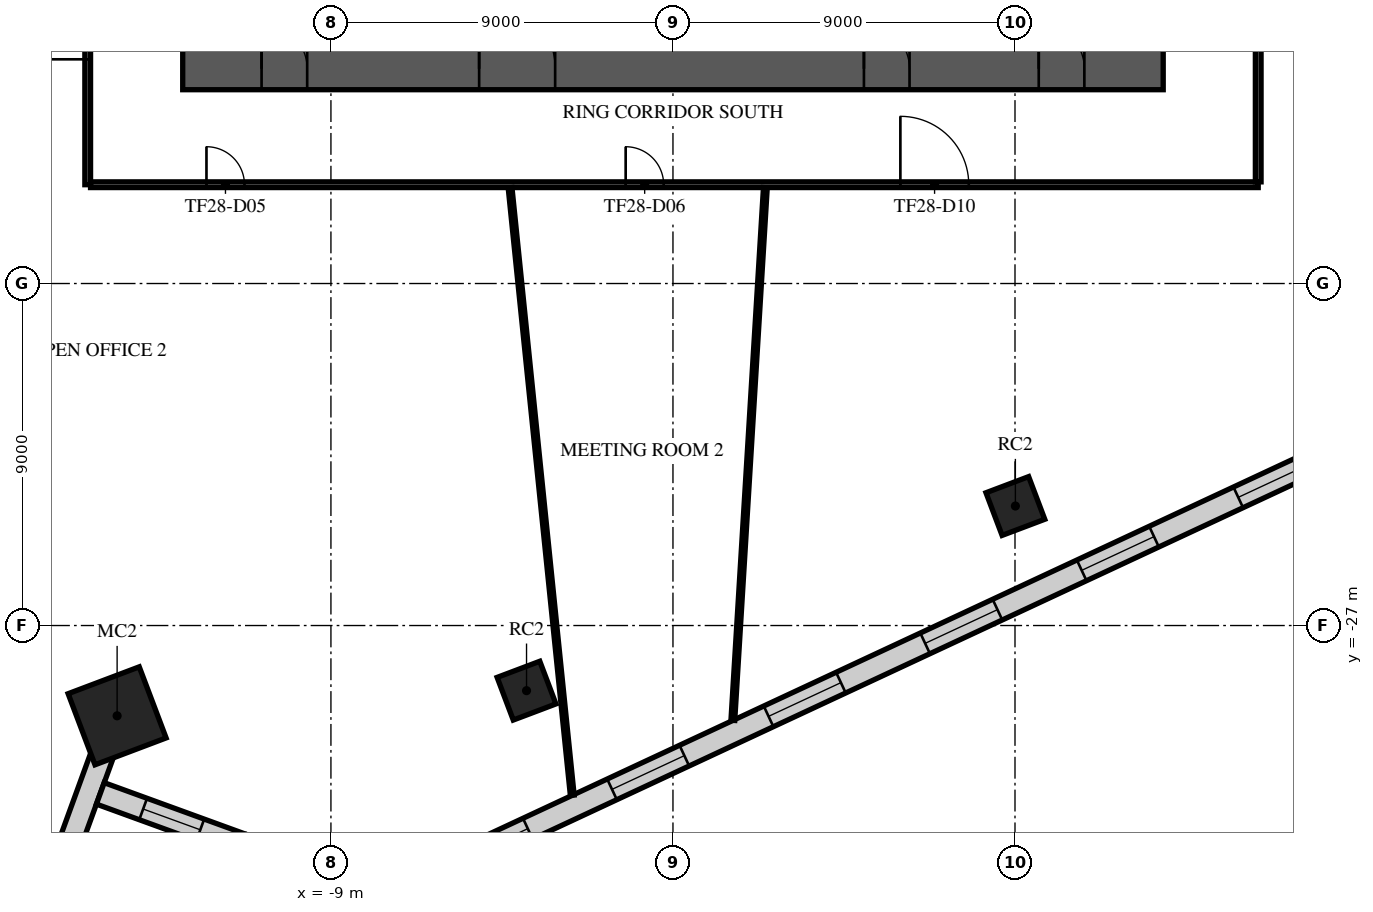
"""IFC4 building model, lengths in metres.
Left out: names, types, materials, properties, quantities, classifications, styles, units other than length and angle.
Written with IfcOpenShell. Run it as: python <this file> out.ifc"""

import sys

from ifc_helpers import new_model, si_unit, direction, frame, frame_2d, origin, origin_2d, place, context, subcontext, project, spatial, rectangle, extrude, element, fill, save


model = new_model("IFC4")
c1 = context("Model", 3, precision=1e-05, world=origin(), true_north=direction((0.0, 1.0)))
c2 = subcontext(c1, "Body", "Model", "MODEL_VIEW")
j1 = project(units=[si_unit("LENGTHUNIT", "METRE"), si_unit("PLANEANGLEUNIT", "RADIAN")], contexts=[c1])
p1 = place(None, origin())
s1 = spatial("IfcSite", under=j1, at=p1, CompositionType="ELEMENT")
p2 = place(p1, origin())
s2 = spatial("IfcBuilding", under=s1, at=p2, CompositionType="ELEMENT")
p3 = place(p2, frame((0.0, 0.0, 122.1)))
s3 = spatial("IfcBuildingStorey", under=s2, at=p3, CompositionType="ELEMENT", Elevation=122.1)
p4 = place(p3, frame((-14.626, -29.376, 0.0), z_axis=(0.0, 0.0, 1.0), x_axis=(0.935491525991, 0.353349125935, 0.0)))
e1 = element("IfcColumn", 1, at=p4, inside=s3, PredefinedType="COLUMN", context=c2, shape_type="SweptSolid", body=[
    extrude(rectangle(XDim=2.0, YDim=2.0, at=origin_2d()), origin(), (0.0, 0.0, 1.0), 4.0),
])
for number, where, z_axis, x_axis in (
    (2, (-3.853, -28.714, 0.0), (0.0, 0.0, 1.0), (0.935, 0.353, 0.0)),
    (3, (9.01, -23.855, 0.0), (0.0, 0.0, 1.0), (0.935, 0.353, 0.0)),
):
    element("IfcColumn", number, at=place(p3, frame(where, z_axis=z_axis, x_axis=x_axis)), inside=s3, PredefinedType="COLUMN", context=c2, shape_type="SweptSolid", body=[
        extrude(rectangle(XDim=1.2, YDim=1.2, at=origin_2d()), origin(), (0.0, 0.0, 1.0), 4.0),
    ])
p5 = place(p3, frame((-12.9, -12.35, 0.0), z_axis=(0.0, 0.0, 1.0), x_axis=(1.0, 0.0, 0.0)))
e4 = element("IfcWall", 4, at=p5, inside=s3, PredefinedType="SHEAR", context=c2, shape_type="SweptSolid", body=[
    extrude(rectangle(XDim=25.8, YDim=1.1, at=frame_2d((12.9, 0.0))), origin(), (0.0, 0.0, 1.0), 3.58),
])
p6 = place(p5, frame((7.8, 0.0, 0.0)))
e5 = element("IfcOpeningElement", 5, at=p6, cuts=e4, PredefinedType="OPENING", context=c2, shape_type="SweptSolid", body=[
    extrude(rectangle(XDim=2.0, YDim=2.1, at=frame_2d((1.0, 1.05))), frame((0.0, 0.56, 0.0), z_axis=(0.0, -1.0, 0.0), x_axis=(1.0, 0.0, 0.0)), (0.0, 0.0, 1.0), 1.12),
])
p7 = place(p5, frame((17.925, 0.0, 0.0)))
e6 = element("IfcOpeningElement", 6, at=p7, cuts=e4, PredefinedType="OPENING", context=c2, shape_type="SweptSolid", body=[
    extrude(rectangle(XDim=1.2, YDim=2.1, at=frame_2d((0.6, 1.05))), frame((0.0, 0.56, 0.0), z_axis=(0.0, -1.0, 0.0), x_axis=(1.0, 0.0, 0.0)), (0.0, 0.0, 1.0), 1.12),
])
p8 = place(p5, frame((2.075, 0.0, 0.0)))
e7 = element("IfcOpeningElement", 7, at=p8, cuts=e4, PredefinedType="OPENING", context=c2, shape_type="SweptSolid", body=[
    extrude(rectangle(XDim=1.2, YDim=2.1, at=frame_2d((0.6, 1.05))), frame((0.0, 0.56, 0.0), z_axis=(0.0, -1.0, 0.0), x_axis=(1.0, 0.0, 0.0)), (0.0, 0.0, 1.0), 1.12),
])
p9 = place(p5, frame((22.525, 0.0, 0.0)))
e8 = element("IfcOpeningElement", 8, at=p9, cuts=e4, PredefinedType="OPENING", context=c2, shape_type="SweptSolid", body=[
    extrude(rectangle(XDim=1.2, YDim=2.1, at=frame_2d((0.6, 1.05))), frame((0.0, 0.56, 0.0), z_axis=(0.0, -1.0, 0.0), x_axis=(1.0, 0.0, 0.0)), (0.0, 0.0, 1.0), 1.12),
])
p10 = place(p3, frame((-16.103, -33.382, 0.0), z_axis=(0.0, 0.0, 1.0), x_axis=(0.342003629731, 0.939698631079, 0.0)))
e9 = element("IfcWall", 9, at=p10, inside=s3, PredefinedType="STANDARD", context=c2, shape_type="SweptSolid", body=[
    extrude(rectangle(XDim=3.159, YDim=0.6, at=frame_2d((1.58, 0.0))), origin(), (0.0, 0.0, 1.0), 3.58),
])
p11 = place(p3, frame((-15.068, -31.418, 0.0), z_axis=(0.0, 0.0, 1.0), x_axis=(0.939679314823, -0.342056698946, 0.0)))
e10 = element("IfcWall", 10, at=p11, inside=s3, PredefinedType="STANDARD", context=c2, shape_type="SweptSolid", body=[
    extrude(rectangle(XDim=4.0, YDim=0.6, at=frame_2d((2.0, 0.0))), origin(), (0.0, 0.0, 1.0), 3.58),
])
p12 = place(p11, frame((1.2, 0.0, 0.9)))
e11 = element("IfcOpeningElement", 11, at=p12, cuts=e10, PredefinedType="OPENING", context=c2, shape_type="SweptSolid", body=[
    extrude(rectangle(XDim=1.6, YDim=2.1, at=frame_2d((0.8, 1.05))), frame((0.0, 0.31, 0.0), z_axis=(0.0, -1.0, 0.0), x_axis=(1.0, 0.0, 0.0)), (0.0, 0.0, 1.0), 0.62),
])
p13 = place(p3, frame((-10.838, -35.618, 0.0), z_axis=(0.0, 0.0, 1.0), x_axis=(0.906307589826, 0.422618684659, 0.0)))
e12 = element("IfcWall", 12, at=p13, inside=s3, PredefinedType="STANDARD", context=c2, shape_type="SweptSolid", body=[
    extrude(rectangle(XDim=49.751, YDim=0.6, at=frame_2d((24.876, 0.0))), origin(), (0.0, 0.0, 1.0), 3.58),
])
p14 = place(p13, frame((1.161, 0.0, 0.9)))
e13 = element("IfcOpeningElement", 13, at=p14, cuts=e12, PredefinedType="OPENING", context=c2, shape_type="SweptSolid", body=[
    extrude(rectangle(XDim=2.1, YDim=2.1, at=frame_2d((1.05, 1.05))), frame((0.0, 0.31, 0.0), z_axis=(0.0, -1.0, 0.0), x_axis=(1.0, 0.0, 0.0)), (0.0, 0.0, 1.0), 0.62),
])
p15 = place(p13, frame((5.644, 0.0, 0.9)))
e14 = element("IfcOpeningElement", 14, at=p15, cuts=e12, PredefinedType="OPENING", context=c2, shape_type="SweptSolid", body=[
    extrude(rectangle(XDim=2.1, YDim=2.1, at=frame_2d((1.05, 1.05))), frame((0.0, 0.31, 0.0), z_axis=(0.0, -1.0, 0.0), x_axis=(1.0, 0.0, 0.0)), (0.0, 0.0, 1.0), 0.62),
])
p16 = place(p13, frame((10.189, 0.0, 0.9)))
e15 = element("IfcOpeningElement", 15, at=p16, cuts=e12, PredefinedType="OPENING", context=c2, shape_type="SweptSolid", body=[
    extrude(rectangle(XDim=2.1, YDim=2.1, at=frame_2d((1.05, 1.05))), frame((0.0, 0.31, 0.0), z_axis=(0.0, -1.0, 0.0), x_axis=(1.0, 0.0, 0.0)), (0.0, 0.0, 1.0), 0.62),
])
p17 = place(p13, frame((14.735, 0.0, 0.9)))
e16 = element("IfcOpeningElement", 16, at=p17, cuts=e12, PredefinedType="OPENING", context=c2, shape_type="SweptSolid", body=[
    extrude(rectangle(XDim=2.1, YDim=2.1, at=frame_2d((1.05, 1.05))), frame((0.0, 0.31, 0.0), z_axis=(0.0, -1.0, 0.0), x_axis=(1.0, 0.0, 0.0)), (0.0, 0.0, 1.0), 0.62),
])
p18 = place(p13, frame((19.28, 0.0, 0.9)))
e17 = element("IfcOpeningElement", 17, at=p18, cuts=e12, PredefinedType="OPENING", context=c2, shape_type="SweptSolid", body=[
    extrude(rectangle(XDim=2.1, YDim=2.1, at=frame_2d((1.05, 1.05))), frame((0.0, 0.31, 0.0), z_axis=(0.0, -1.0, 0.0), x_axis=(1.0, 0.0, 0.0)), (0.0, 0.0, 1.0), 0.62),
])
p19 = place(p13, frame((23.826, 0.0, 0.9)))
e18 = element("IfcOpeningElement", 18, at=p19, cuts=e12, PredefinedType="OPENING", context=c2, shape_type="SweptSolid", body=[
    extrude(rectangle(XDim=2.1, YDim=2.1, at=frame_2d((1.05, 1.05))), frame((0.0, 0.31, 0.0), z_axis=(0.0, -1.0, 0.0), x_axis=(1.0, 0.0, 0.0)), (0.0, 0.0, 1.0), 0.62),
])
p20 = place(p13, frame((28.371, 0.0, 0.9)))
e19 = element("IfcOpeningElement", 19, at=p20, cuts=e12, PredefinedType="OPENING", context=c2, shape_type="SweptSolid", body=[
    extrude(rectangle(XDim=2.1, YDim=2.1, at=frame_2d((1.05, 1.05))), frame((0.0, 0.31, 0.0), z_axis=(0.0, -1.0, 0.0), x_axis=(1.0, 0.0, 0.0)), (0.0, 0.0, 1.0), 0.62),
])
p21 = place(p13, frame((32.917, 0.0, 0.9)))
e20 = element("IfcOpeningElement", 20, at=p21, cuts=e12, PredefinedType="OPENING", context=c2, shape_type="SweptSolid", body=[
    extrude(rectangle(XDim=2.1, YDim=2.1, at=frame_2d((1.05, 1.05))), frame((0.0, 0.31, 0.0), z_axis=(0.0, -1.0, 0.0), x_axis=(1.0, 0.0, 0.0)), (0.0, 0.0, 1.0), 0.62),
])
p22 = place(p13, frame((37.462, 0.0, 0.9)))
e21 = element("IfcOpeningElement", 21, at=p22, cuts=e12, PredefinedType="OPENING", context=c2, shape_type="SweptSolid", body=[
    extrude(rectangle(XDim=2.1, YDim=2.1, at=frame_2d((1.05, 1.05))), frame((0.0, 0.31, 0.0), z_axis=(0.0, -1.0, 0.0), x_axis=(1.0, 0.0, 0.0)), (0.0, 0.0, 1.0), 0.62),
])
p23 = place(p13, frame((42.008, 0.0, 0.9)))
e22 = element("IfcOpeningElement", 22, at=p23, cuts=e12, PredefinedType="OPENING", context=c2, shape_type="SweptSolid", body=[
    extrude(rectangle(XDim=2.1, YDim=2.1, at=frame_2d((1.05, 1.05))), frame((0.0, 0.31, 0.0), z_axis=(0.0, -1.0, 0.0), x_axis=(1.0, 0.0, 0.0)), (0.0, 0.0, 1.0), 0.62),
])
p24 = place(p13, frame((46.491, 0.0, 0.9)))
e23 = element("IfcOpeningElement", 23, at=p24, cuts=e12, PredefinedType="OPENING", context=c2, shape_type="SweptSolid", body=[
    extrude(rectangle(XDim=2.1, YDim=2.1, at=frame_2d((1.05, 1.05))), frame((0.0, 0.31, 0.0), z_axis=(0.0, -1.0, 0.0), x_axis=(1.0, 0.0, 0.0)), (0.0, 0.0, 1.0), 0.62),
])
p25 = place(p3, frame((-15.4, -15.4, 0.0), z_axis=(0.0, 0.0, 1.0), x_axis=(0.0, 1.0, 0.0)))
e24 = element("IfcWall", 24, at=p25, inside=s3, PredefinedType="PARTITIONING", context=c2, shape_type="SweptSolid", body=[
    extrude(rectangle(XDim=30.8, YDim=0.15, at=frame_2d((15.4, 0.0))), origin(), (0.0, 0.0, 1.0), 3.08),
])
p26 = place(p25, frame((13.024, 0.0, 0.0)))
e25 = element("IfcOpeningElement", 25, at=p26, cuts=e24, PredefinedType="OPENING", context=c2, shape_type="SweptSolid", body=[
    extrude(rectangle(XDim=1.0, YDim=2.1, at=frame_2d((0.5, 1.05))), frame((0.0, 0.085, 0.0), z_axis=(0.0, -1.0, 0.0), x_axis=(1.0, 0.0, 0.0)), (0.0, 0.0, 1.0), 0.17),
])
p27 = place(p25, frame((18.069, 0.0, 0.0)))
e26 = element("IfcOpeningElement", 26, at=p27, cuts=e24, PredefinedType="OPENING", context=c2, shape_type="SweptSolid", body=[
    extrude(rectangle(XDim=1.8, YDim=2.1, at=frame_2d((0.9, 1.05))), frame((0.0, 0.085, 0.0), z_axis=(0.0, -1.0, 0.0), x_axis=(1.0, 0.0, 0.0)), (0.0, 0.0, 1.0), 0.17),
])
p28 = place(p25, frame((27.569, 0.0, 0.0)))
e27 = element("IfcOpeningElement", 27, at=p28, cuts=e24, PredefinedType="OPENING", context=c2, shape_type="SweptSolid", body=[
    extrude(rectangle(XDim=1.0, YDim=2.1, at=frame_2d((0.5, 1.05))), frame((0.0, 0.085, 0.0), z_axis=(0.0, -1.0, 0.0), x_axis=(1.0, 0.0, 0.0)), (0.0, 0.0, 1.0), 0.17),
])
p29 = place(p25, frame((3.3, 0.0, 0.0)))
e28 = element("IfcOpeningElement", 28, at=p29, cuts=e24, PredefinedType="OPENING", context=c2, shape_type="SweptSolid", body=[
    extrude(rectangle(XDim=1.8, YDim=2.1, at=frame_2d((0.9, 1.05))), frame((0.0, 0.085, 0.0), z_axis=(0.0, -1.0, 0.0), x_axis=(1.0, 0.0, 0.0)), (0.0, 0.0, 1.0), 0.17),
])
p30 = place(p3, frame((-15.325, -15.4, 0.0), z_axis=(0.0, 0.0, 1.0), x_axis=(1.0, 0.0, 0.0)))
e29 = element("IfcWall", 29, at=p30, inside=s3, PredefinedType="PARTITIONING", context=c2, shape_type="SweptSolid", body=[
    extrude(rectangle(XDim=30.725, YDim=0.15, at=frame_2d((15.362, 0.0))), origin(), (0.0, 0.0, 1.0), 3.08),
])
p31 = place(p30, frame((3.05, 0.0, 0.0)))
e30 = element("IfcOpeningElement", 30, at=p31, cuts=e29, PredefinedType="OPENING", context=c2, shape_type="SweptSolid", body=[
    extrude(rectangle(XDim=1.0, YDim=2.1, at=frame_2d((0.5, 1.05))), frame((0.0, 0.085, 0.0), z_axis=(0.0, -1.0, 0.0), x_axis=(1.0, 0.0, 0.0)), (0.0, 0.0, 1.0), 0.17),
])
p32 = place(p30, frame((14.081, 0.0, 0.0)))
e31 = element("IfcOpeningElement", 31, at=p32, cuts=e29, PredefinedType="OPENING", context=c2, shape_type="SweptSolid", body=[
    extrude(rectangle(XDim=1.0, YDim=2.1, at=frame_2d((0.5, 1.05))), frame((0.0, 0.085, 0.0), z_axis=(0.0, -1.0, 0.0), x_axis=(1.0, 0.0, 0.0)), (0.0, 0.0, 1.0), 0.17),
])
p33 = place(p30, frame((21.309, 0.0, 0.0)))
e32 = element("IfcOpeningElement", 32, at=p33, cuts=e29, PredefinedType="OPENING", context=c2, shape_type="SweptSolid", body=[
    extrude(rectangle(XDim=1.8, YDim=2.1, at=frame_2d((0.9, 1.05))), frame((0.0, 0.085, 0.0), z_axis=(0.0, -1.0, 0.0), x_axis=(1.0, 0.0, 0.0)), (0.0, 0.0, 1.0), 0.17),
])
p34 = place(p3, frame((15.4, -15.325, 0.0), z_axis=(0.0, 0.0, 1.0), x_axis=(0.0, 1.0, 0.0)))
e33 = element("IfcWall", 33, at=p34, inside=s3, PredefinedType="PARTITIONING", context=c2, shape_type="SweptSolid", body=[
    extrude(rectangle(XDim=30.65, YDim=0.15, at=frame_2d((15.325, 0.0))), origin(), (0.0, 0.0, 1.0), 3.08),
])
p35 = place(p34, frame((21.198, 0.0, 0.0)))
e34 = element("IfcOpeningElement", 34, at=p35, cuts=e33, PredefinedType="OPENING", context=c2, shape_type="SweptSolid", body=[
    extrude(rectangle(XDim=1.8, YDim=2.1, at=frame_2d((0.9, 1.05))), frame((0.0, 0.085, 0.0), z_axis=(0.0, -1.0, 0.0), x_axis=(1.0, 0.0, 0.0)), (0.0, 0.0, 1.0), 0.17),
])
p36 = place(p34, frame((26.198, 0.0, 0.0)))
e35 = element("IfcOpeningElement", 35, at=p36, cuts=e33, PredefinedType="OPENING", context=c2, shape_type="SweptSolid", body=[
    extrude(rectangle(XDim=1.0, YDim=2.1, at=frame_2d((0.5, 1.05))), frame((0.0, 0.085, 0.0), z_axis=(0.0, -1.0, 0.0), x_axis=(1.0, 0.0, 0.0)), (0.0, 0.0, 1.0), 0.17),
])
p37 = place(p34, frame((8.3, 0.0, 0.0)))
e36 = element("IfcOpeningElement", 36, at=p37, cuts=e33, PredefinedType="OPENING", context=c2, shape_type="SweptSolid", body=[
    extrude(rectangle(XDim=1.0, YDim=2.1, at=frame_2d((0.5, 1.05))), frame((0.0, 0.085, 0.0), z_axis=(0.0, -1.0, 0.0), x_axis=(1.0, 0.0, 0.0)), (0.0, 0.0, 1.0), 0.17),
])
p38 = place(p34, frame((13.856, 0.0, 0.0)))
e37 = element("IfcOpeningElement", 37, at=p38, cuts=e33, PredefinedType="OPENING", context=c2, shape_type="SweptSolid", body=[
    extrude(rectangle(XDim=1.0, YDim=2.1, at=frame_2d((0.5, 1.05))), frame((0.0, 0.085, 0.0), z_axis=(0.0, -1.0, 0.0), x_axis=(1.0, 0.0, 0.0)), (0.0, 0.0, 1.0), 0.17),
])
p39 = place(p3, frame((-4.286, -15.48, 0.0), z_axis=(0.0, 0.0, 1.0), x_axis=(0.101806428454, -0.994804227537, 0.0)))
e38 = element("IfcWall", 38, at=p39, inside=s3, PredefinedType="PARTITIONING", context=c2, shape_type="SweptSolid", body=[
    extrude(rectangle(XDim=16.07, YDim=0.1, at=frame_2d((8.035, 0.0))), origin(), (0.0, 0.0, 1.0), 2.83),
])
p40 = place(p3, frame((1.576, -29.496, 0.0), z_axis=(0.0, 0.0, 1.0), x_axis=(0.06091495283, 0.998142959962, 0.0)))
e39 = element("IfcWall", 39, at=p40, inside=s3, PredefinedType="PARTITIONING", context=c2, shape_type="SweptSolid", body=[
    extrude(rectangle(XDim=14.044, YDim=0.1, at=frame_2d((7.022, 0.0))), origin(), (0.0, 0.0, 1.0), 2.83),
])
p41 = place(p6, origin())
e40 = element("IfcDoor", 40, at=p41, inside=s3, OperationType="SINGLE_SWING_LEFT", PredefinedType="DOOR", context=c2, shape_type="SweptSolid", body=[
    extrude(rectangle(XDim=2.0, YDim=2.1, at=frame_2d((1.0, 1.05))), frame((0.0, 0.025, 0.0), z_axis=(0.0, -1.0, 0.0), x_axis=(1.0, 0.0, 0.0)), (0.0, 0.0, 1.0), 0.05),
])
fill(e5, e40)
p42 = place(p7, origin())
e41 = element("IfcDoor", 41, at=p42, inside=s3, OperationType="SINGLE_SWING_LEFT", PredefinedType="DOOR", context=c2, shape_type="SweptSolid", body=[
    extrude(rectangle(XDim=1.2, YDim=2.1, at=frame_2d((0.6, 1.05))), frame((0.0, 0.025, 0.0), z_axis=(0.0, -1.0, 0.0), x_axis=(1.0, 0.0, 0.0)), (0.0, 0.0, 1.0), 0.05),
])
fill(e6, e41)
p43 = place(p8, origin())
e42 = element("IfcDoor", 42, at=p43, inside=s3, OperationType="SINGLE_SWING_LEFT", PredefinedType="DOOR", context=c2, shape_type="SweptSolid", body=[
    extrude(rectangle(XDim=1.2, YDim=2.1, at=frame_2d((0.6, 1.05))), frame((0.0, 0.025, 0.0), z_axis=(0.0, -1.0, 0.0), x_axis=(1.0, 0.0, 0.0)), (0.0, 0.0, 1.0), 0.05),
])
fill(e7, e42)
p44 = place(p9, origin())
e43 = element("IfcDoor", 43, at=p44, inside=s3, OperationType="SINGLE_SWING_LEFT", PredefinedType="DOOR", context=c2, shape_type="SweptSolid", body=[
    extrude(rectangle(XDim=1.2, YDim=2.1, at=frame_2d((0.6, 1.05))), frame((0.0, 0.025, 0.0), z_axis=(0.0, -1.0, 0.0), x_axis=(1.0, 0.0, 0.0)), (0.0, 0.0, 1.0), 0.05),
])
fill(e8, e43)
p45 = place(p12, origin())
e44 = element("IfcWindow", 44, at=p45, inside=s3, PartitioningType="SINGLE_PANEL", PredefinedType="WINDOW", context=c2, shape_type="SweptSolid", body=[
    extrude(rectangle(XDim=1.6, YDim=2.1, at=frame_2d((0.8, 1.05))), frame((0.0, 0.03, 0.0), z_axis=(0.0, -1.0, 0.0), x_axis=(1.0, 0.0, 0.0)), (0.0, 0.0, 1.0), 0.06),
])
fill(e11, e44)
p46 = place(p15, origin())
e45 = element("IfcWindow", 45, at=p46, inside=s3, PartitioningType="SINGLE_PANEL", PredefinedType="WINDOW", context=c2, shape_type="SweptSolid", body=[
    extrude(rectangle(XDim=2.1, YDim=2.1, at=frame_2d((1.05, 1.05))), frame((0.0, 0.03, 0.0), z_axis=(0.0, -1.0, 0.0), x_axis=(1.0, 0.0, 0.0)), (0.0, 0.0, 1.0), 0.06),
])
fill(e14, e45)
p47 = place(p16, origin())
e46 = element("IfcWindow", 46, at=p47, inside=s3, PartitioningType="SINGLE_PANEL", PredefinedType="WINDOW", context=c2, shape_type="SweptSolid", body=[
    extrude(rectangle(XDim=2.1, YDim=2.1, at=frame_2d((1.05, 1.05))), frame((0.0, 0.03, 0.0), z_axis=(0.0, -1.0, 0.0), x_axis=(1.0, 0.0, 0.0)), (0.0, 0.0, 1.0), 0.06),
])
fill(e15, e46)
p48 = place(p17, origin())
e47 = element("IfcWindow", 47, at=p48, inside=s3, PartitioningType="SINGLE_PANEL", PredefinedType="WINDOW", context=c2, shape_type="SweptSolid", body=[
    extrude(rectangle(XDim=2.1, YDim=2.1, at=frame_2d((1.05, 1.05))), frame((0.0, 0.03, 0.0), z_axis=(0.0, -1.0, 0.0), x_axis=(1.0, 0.0, 0.0)), (0.0, 0.0, 1.0), 0.06),
])
fill(e16, e47)
p49 = place(p18, origin())
e48 = element("IfcWindow", 48, at=p49, inside=s3, PartitioningType="SINGLE_PANEL", PredefinedType="WINDOW", context=c2, shape_type="SweptSolid", body=[
    extrude(rectangle(XDim=2.1, YDim=2.1, at=frame_2d((1.05, 1.05))), frame((0.0, 0.03, 0.0), z_axis=(0.0, -1.0, 0.0), x_axis=(1.0, 0.0, 0.0)), (0.0, 0.0, 1.0), 0.06),
])
fill(e17, e48)
p50 = place(p19, origin())
e49 = element("IfcWindow", 49, at=p50, inside=s3, PartitioningType="SINGLE_PANEL", PredefinedType="WINDOW", context=c2, shape_type="SweptSolid", body=[
    extrude(rectangle(XDim=2.1, YDim=2.1, at=frame_2d((1.05, 1.05))), frame((0.0, 0.03, 0.0), z_axis=(0.0, -1.0, 0.0), x_axis=(1.0, 0.0, 0.0)), (0.0, 0.0, 1.0), 0.06),
])
fill(e18, e49)
p51 = place(p20, origin())
e50 = element("IfcWindow", 50, at=p51, inside=s3, PartitioningType="SINGLE_PANEL", PredefinedType="WINDOW", context=c2, shape_type="SweptSolid", body=[
    extrude(rectangle(XDim=2.1, YDim=2.1, at=frame_2d((1.05, 1.05))), frame((0.0, 0.03, 0.0), z_axis=(0.0, -1.0, 0.0), x_axis=(1.0, 0.0, 0.0)), (0.0, 0.0, 1.0), 0.06),
])
fill(e19, e50)
p52 = place(p29, origin())
e51 = element("IfcDoor", 51, at=p52, inside=s3, OperationType="DOUBLE_DOOR_SINGLE_SWING", PredefinedType="DOOR", context=c2, shape_type="SweptSolid", body=[
    extrude(rectangle(XDim=1.8, YDim=2.1, at=frame_2d((0.9, 1.05))), frame((0.0, 0.025, 0.0), z_axis=(0.0, -1.0, 0.0), x_axis=(1.0, 0.0, 0.0)), (0.0, 0.0, 1.0), 0.05),
])
fill(e28, e51)
p53 = place(p31, frame((1.0, 0.0, 0.0), z_axis=(0.0, 0.0, 1.0), x_axis=(-1.0, 0.0, 0.0)))
e52 = element("IfcDoor", 52, at=p53, inside=s3, OperationType="SINGLE_SWING_RIGHT", PredefinedType="DOOR", context=c2, shape_type="SweptSolid", body=[
    extrude(rectangle(XDim=1.0, YDim=2.1, at=frame_2d((0.5, 1.05))), frame((0.0, 0.025, 0.0), z_axis=(0.0, -1.0, 0.0), x_axis=(1.0, 0.0, 0.0)), (0.0, 0.0, 1.0), 0.05),
])
fill(e30, e52)
p54 = place(p32, frame((1.0, 0.0, 0.0), z_axis=(0.0, 0.0, 1.0), x_axis=(-1.0, 0.0, 0.0)))
e53 = element("IfcDoor", 53, at=p54, inside=s3, OperationType="SINGLE_SWING_RIGHT", PredefinedType="DOOR", context=c2, shape_type="SweptSolid", body=[
    extrude(rectangle(XDim=1.0, YDim=2.1, at=frame_2d((0.5, 1.05))), frame((0.0, 0.025, 0.0), z_axis=(0.0, -1.0, 0.0), x_axis=(1.0, 0.0, 0.0)), (0.0, 0.0, 1.0), 0.05),
])
fill(e31, e53)
p55 = place(p33, frame((1.8, 0.0, 0.0), z_axis=(0.0, 0.0, 1.0), x_axis=(-1.0, 0.0, 0.0)))
e54 = element("IfcDoor", 54, at=p55, inside=s3, OperationType="DOUBLE_DOOR_SINGLE_SWING", PredefinedType="DOOR", context=c2, shape_type="SweptSolid", body=[
    extrude(rectangle(XDim=1.8, YDim=2.1, at=frame_2d((0.9, 1.05))), frame((0.0, 0.025, 0.0), z_axis=(0.0, -1.0, 0.0), x_axis=(1.0, 0.0, 0.0)), (0.0, 0.0, 1.0), 0.05),
])
fill(e32, e54)
save(model, sys.argv[1])
